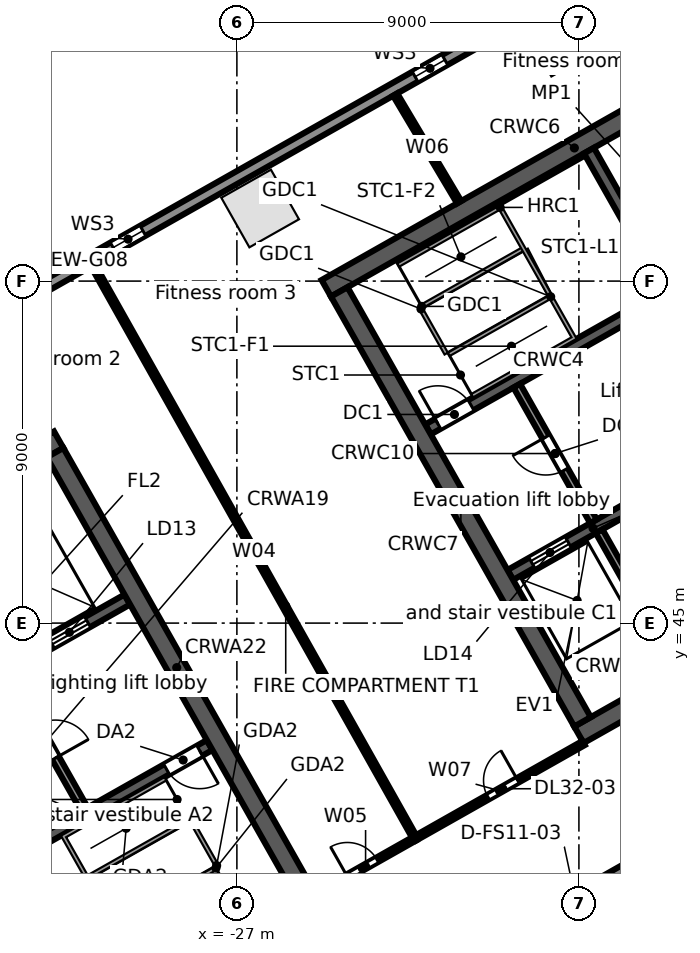
"""IFC4 building model, lengths in metres.
Left out: names, types, materials, properties, quantities, classifications, styles, units other than length and angle.
Written with IfcOpenShell. Run it as: python <this file> out.ifc"""

import sys

from ifc_helpers import new_model, si_unit, direction, frame, frame_2d, origin, origin_2d, place, context, subcontext, project, spatial, rectangle, extrude, element, fill, save


model = new_model("IFC4")
c1 = context("Model", 3, precision=1e-05, world=origin(), true_north=direction((0.0, 1.0)))
c2 = subcontext(c1, "Body", "Model", "MODEL_VIEW")
j1 = project(units=[si_unit("LENGTHUNIT", "METRE"), si_unit("PLANEANGLEUNIT", "RADIAN")], contexts=[c1])
p1 = place(None, origin())
s1 = spatial("IfcSite", under=j1, at=p1, CompositionType="ELEMENT")
p2 = place(p1, origin())
s2 = spatial("IfcBuilding", under=s1, at=p2, CompositionType="ELEMENT")
p3 = place(p2, frame((0.0, 0.0, 158.9)))
s3 = spatial("IfcBuildingStorey", under=s2, at=p3, CompositionType="ELEMENT", Elevation=158.9)
for number, where, z_axis, x_axis in (
    (1, (-18.441, 60.406, 0.0), (0.0, 0.0, 1.0), (-0.87, -0.492, 0.0)),
    (2, (-26.388, 55.91, 0.0), (0.0, 0.0, 1.0), (-0.87, -0.492, 0.0)),
):
    element("IfcColumn", number, at=place(p3, frame(where, z_axis=z_axis, x_axis=x_axis)), inside=s3, PredefinedType="COLUMN", context=c2, shape_type="SweptSolid", body=[
        extrude(rectangle(XDim=1.5, YDim=1.5, at=origin_2d()), origin(), (0.0, 0.0, 1.0), 4.0),
    ])
p4 = place(p3, frame((-0.055, 47.969, 0.0), z_axis=(0.0, 0.0, 1.0), x_axis=(-0.870355730478, -0.492423499058, 0.0)))
e3 = element("IfcWall", 3, at=p4, inside=s3, PredefinedType="STANDARD", context=c2, shape_type="SweptSolid", body=[
    extrude(rectangle(XDim=43.75, YDim=0.3, at=frame_2d((21.875, 0.0))), origin(), (0.0, 0.0, 1.0), 3.68),
])
p5 = place(p4, frame((39.977, 0.0, 0.6)))
e4 = element("IfcOpeningElement", 4, at=p5, cuts=e3, PredefinedType="OPENING", context=c2, shape_type="SweptSolid", body=[
    extrude(rectangle(XDim=0.9, YDim=2.4, at=frame_2d((0.45, 1.2))), frame((0.0, 0.16, 0.0), z_axis=(0.0, -1.0, 0.0), x_axis=(1.0, 0.0, 0.0)), (0.0, 0.0, 1.0), 0.32),
])
p6 = place(p4, frame((37.338, 0.0, 0.0)))
e5 = element("IfcOpeningElement", 5, at=p6, cuts=e3, PredefinedType="OPENING", context=c2, shape_type="SweptSolid", body=[
    extrude(rectangle(XDim=1.8, YDim=2.4, at=frame_2d((0.9, 1.2))), frame((0.0, 0.16, 0.0), z_axis=(0.0, -1.0, 0.0), x_axis=(1.0, 0.0, 0.0)), (0.0, 0.0, 1.0), 0.32),
])
p7 = place(p4, frame((31.222, 0.0, 0.6)))
e6 = element("IfcOpeningElement", 6, at=p7, cuts=e3, PredefinedType="OPENING", context=c2, shape_type="SweptSolid", body=[
    extrude(rectangle(XDim=0.9, YDim=2.4, at=frame_2d((0.45, 1.2))), frame((0.0, 0.16, 0.0), z_axis=(0.0, -1.0, 0.0), x_axis=(1.0, 0.0, 0.0)), (0.0, 0.0, 1.0), 0.32),
])
p8 = place(p4, frame((28.584, 0.0, 0.0)))
e7 = element("IfcOpeningElement", 7, at=p8, cuts=e3, PredefinedType="OPENING", context=c2, shape_type="SweptSolid", body=[
    extrude(rectangle(XDim=1.8, YDim=2.4, at=frame_2d((0.9, 1.2))), frame((0.0, 0.16, 0.0), z_axis=(0.0, -1.0, 0.0), x_axis=(1.0, 0.0, 0.0)), (0.0, 0.0, 1.0), 0.32),
])
p9 = place(p4, frame((22.468, 0.0, 0.6)))
e8 = element("IfcOpeningElement", 8, at=p9, cuts=e3, PredefinedType="OPENING", context=c2, shape_type="SweptSolid", body=[
    extrude(rectangle(XDim=0.9, YDim=2.4, at=frame_2d((0.45, 1.2))), frame((0.0, 0.16, 0.0), z_axis=(0.0, -1.0, 0.0), x_axis=(1.0, 0.0, 0.0)), (0.0, 0.0, 1.0), 0.32),
])
p10 = place(p4, frame((19.829, 0.0, 0.0)))
e9 = element("IfcOpeningElement", 9, at=p10, cuts=e3, PredefinedType="OPENING", context=c2, shape_type="SweptSolid", body=[
    extrude(rectangle(XDim=1.8, YDim=2.4, at=frame_2d((0.9, 1.2))), frame((0.0, 0.16, 0.0), z_axis=(0.0, -1.0, 0.0), x_axis=(1.0, 0.0, 0.0)), (0.0, 0.0, 1.0), 0.32),
])
p11 = place(p4, frame((13.713, 0.0, 0.6)))
e10 = element("IfcOpeningElement", 10, at=p11, cuts=e3, PredefinedType="OPENING", context=c2, shape_type="SweptSolid", body=[
    extrude(rectangle(XDim=0.9, YDim=2.4, at=frame_2d((0.45, 1.2))), frame((0.0, 0.16, 0.0), z_axis=(0.0, -1.0, 0.0), x_axis=(1.0, 0.0, 0.0)), (0.0, 0.0, 1.0), 0.32),
])
p12 = place(p4, frame((11.075, 0.0, 0.0)))
e11 = element("IfcOpeningElement", 11, at=p12, cuts=e3, PredefinedType="OPENING", context=c2, shape_type="SweptSolid", body=[
    extrude(rectangle(XDim=1.8, YDim=2.4, at=frame_2d((0.9, 1.2))), frame((0.0, 0.16, 0.0), z_axis=(0.0, -1.0, 0.0), x_axis=(1.0, 0.0, 0.0)), (0.0, 0.0, 1.0), 0.32),
])
p13 = place(p4, frame((4.959, 0.0, 0.6)))
e12 = element("IfcOpeningElement", 12, at=p13, cuts=e3, PredefinedType="OPENING", context=c2, shape_type="SweptSolid", body=[
    extrude(rectangle(XDim=0.9, YDim=2.4, at=frame_2d((0.45, 1.2))), frame((0.0, 0.16, 0.0), z_axis=(0.0, -1.0, 0.0), x_axis=(1.0, 0.0, 0.0)), (0.0, 0.0, 1.0), 0.32),
])
p14 = place(p4, frame((2.32, 0.0, 0.0)))
e13 = element("IfcOpeningElement", 13, at=p14, cuts=e3, PredefinedType="OPENING", context=c2, shape_type="SweptSolid", body=[
    extrude(rectangle(XDim=1.8, YDim=2.4, at=frame_2d((0.9, 1.2))), frame((0.0, 0.16, 0.0), z_axis=(0.0, -1.0, 0.0), x_axis=(1.0, 0.0, 0.0)), (0.0, 0.0, 1.0), 0.32),
])
p15 = place(p3, frame((-58.745, 38.764, 0.0), z_axis=(0.0, 0.0, 1.0), x_axis=(0.870355811726, 0.492423355453, 0.0)))
e14 = element("IfcWall", 14, at=p15, inside=s3, PredefinedType="STANDARD", context=c2, shape_type="SweptSolid", body=[
    extrude(rectangle(XDim=64.025, YDim=0.3, at=frame_2d((32.013, 0.0))), origin(), (0.0, 0.0, 1.0), 3.68),
])
p16 = place(p15, frame((60.122, 0.0, 0.6)))
e15 = element("IfcOpeningElement", 15, at=p16, cuts=e14, PredefinedType="OPENING", context=c2, shape_type="SweptSolid", body=[
    extrude(rectangle(XDim=0.9, YDim=2.4, at=frame_2d((0.45, 1.2))), frame((0.0, 0.16, 0.0), z_axis=(0.0, -1.0, 0.0), x_axis=(1.0, 0.0, 0.0)), (0.0, 0.0, 1.0), 0.32),
])
p17 = place(p15, frame((50.992, 0.0, 0.6)))
e16 = element("IfcOpeningElement", 16, at=p17, cuts=e14, PredefinedType="OPENING", context=c2, shape_type="SweptSolid", body=[
    extrude(rectangle(XDim=0.9, YDim=2.4, at=frame_2d((0.45, 1.2))), frame((0.0, 0.16, 0.0), z_axis=(0.0, -1.0, 0.0), x_axis=(1.0, 0.0, 0.0)), (0.0, 0.0, 1.0), 0.32),
])
p18 = place(p15, frame((41.862, 0.0, 0.6)))
e17 = element("IfcOpeningElement", 17, at=p18, cuts=e14, PredefinedType="OPENING", context=c2, shape_type="SweptSolid", body=[
    extrude(rectangle(XDim=0.9, YDim=2.4, at=frame_2d((0.45, 1.2))), frame((0.0, 0.16, 0.0), z_axis=(0.0, -1.0, 0.0), x_axis=(1.0, 0.0, 0.0)), (0.0, 0.0, 1.0), 0.32),
])
p19 = place(p15, frame((32.732, 0.0, 0.6)))
e18 = element("IfcOpeningElement", 18, at=p19, cuts=e14, PredefinedType="OPENING", context=c2, shape_type="SweptSolid", body=[
    extrude(rectangle(XDim=0.9, YDim=2.4, at=frame_2d((0.45, 1.2))), frame((0.0, 0.16, 0.0), z_axis=(0.0, -1.0, 0.0), x_axis=(1.0, 0.0, 0.0)), (0.0, 0.0, 1.0), 0.32),
])
p20 = place(p15, frame((23.602, 0.0, 0.6)))
e19 = element("IfcOpeningElement", 19, at=p20, cuts=e14, PredefinedType="OPENING", context=c2, shape_type="SweptSolid", body=[
    extrude(rectangle(XDim=0.9, YDim=2.4, at=frame_2d((0.45, 1.2))), frame((0.0, 0.16, 0.0), z_axis=(0.0, -1.0, 0.0), x_axis=(1.0, 0.0, 0.0)), (0.0, 0.0, 1.0), 0.32),
])
p21 = place(p15, frame((14.472, 0.0, 0.6)))
e20 = element("IfcOpeningElement", 20, at=p21, cuts=e14, PredefinedType="OPENING", context=c2, shape_type="SweptSolid", body=[
    extrude(rectangle(XDim=0.9, YDim=2.4, at=frame_2d((0.45, 1.2))), frame((0.0, 0.16, 0.0), z_axis=(0.0, -1.0, 0.0), x_axis=(1.0, 0.0, 0.0)), (0.0, 0.0, 1.0), 0.32),
])
p22 = place(p15, frame((5.342, 0.0, 0.6)))
e21 = element("IfcOpeningElement", 21, at=p22, cuts=e14, PredefinedType="OPENING", context=c2, shape_type="SweptSolid", body=[
    extrude(rectangle(XDim=0.9, YDim=2.4, at=frame_2d((0.45, 1.2))), frame((0.0, 0.16, 0.0), z_axis=(0.0, -1.0, 0.0), x_axis=(1.0, 0.0, 0.0)), (0.0, 0.0, 1.0), 0.32),
])
p23 = place(p3, frame((-34.245, 38.097, 0.0), z_axis=(0.0, 0.0, 1.0), x_axis=(0.870364520461, 0.492407962489, 0.0)))
e22 = element("IfcWall", 22, at=p23, inside=s3, PredefinedType="SOLIDWALL", context=c2, shape_type="SweptSolid", body=[
    extrude(rectangle(XDim=7.5, YDim=0.3, at=frame_2d((3.75, 0.0))), origin(), (0.0, 0.0, 1.0), 3.68),
])
p24 = place(p23, frame((6.2, 0.0, 0.0)))
e23 = element("IfcOpeningElement", 23, at=p24, cuts=e22, PredefinedType="OPENING", context=c2, shape_type="SweptSolid", body=[
    extrude(rectangle(XDim=1.0, YDim=2.1, at=frame_2d((0.5, 1.05))), frame((0.0, 0.16, 0.0), z_axis=(0.0, -1.0, 0.0), x_axis=(1.0, 0.0, 0.0)), (0.0, 0.0, 1.0), 0.32),
])
p25 = place(p3, frame((-37.282, 41.435, 0.0), z_axis=(0.0, 0.0, 1.0), x_axis=(0.870356271124, 0.492422543467, 0.0)))
e24 = element("IfcWall", 24, at=p25, inside=s3, PredefinedType="SOLIDWALL", context=c2, shape_type="SweptSolid", body=[
    extrude(rectangle(XDim=8.5, YDim=0.3, at=frame_2d((4.25, 0.0))), origin(), (0.0, 0.0, 1.0), 3.68),
])
p26 = place(p25, frame((6.2, 0.0, 0.0)))
e25 = element("IfcOpeningElement", 25, at=p26, cuts=e24, PredefinedType="OPENING", context=c2, shape_type="SweptSolid", body=[
    extrude(rectangle(XDim=1.1, YDim=2.1, at=frame_2d((0.55, 1.05))), frame((0.0, 0.16, 0.0), z_axis=(0.0, -1.0, 0.0), x_axis=(1.0, 0.0, 0.0)), (0.0, 0.0, 1.0), 0.32),
])
p27 = place(p25, frame((1.95, 0.0, 0.0)))
e26 = element("IfcOpeningElement", 26, at=p27, cuts=e24, PredefinedType="OPENING", context=c2, shape_type="SweptSolid", body=[
    extrude(rectangle(XDim=0.9, YDim=2.1, at=frame_2d((0.45, 1.05))), frame((0.0, 0.16, 0.0), z_axis=(0.0, -1.0, 0.0), x_axis=(1.0, 0.0, 0.0)), (0.0, 0.0, 1.0), 0.32),
])
p28 = place(p3, frame((-46.486, 41.455, 0.0), z_axis=(0.0, 0.0, 1.0), x_axis=(0.870353598469, 0.492427267353, 0.0)))
e27 = element("IfcWall", 27, at=p28, inside=s3, PredefinedType="SOLIDWALL", context=c2, shape_type="SweptSolid", body=[
    extrude(rectangle(XDim=17.0, YDim=0.5, at=frame_2d((8.5, 0.0))), origin(), (0.0, 0.0, 1.0), 3.68),
])
p29 = place(p3, frame((-33.031, 43.667, 0.0), z_axis=(0.0, 0.0, 1.0), x_axis=(0.492408451753, -0.87036424366, 0.0)))
e28 = element("IfcWall", 28, at=p29, inside=s3, PredefinedType="PARTITIONING", context=c2, shape_type="SweptSolid", body=[
    extrude(rectangle(XDim=4.1, YDim=0.2, at=frame_2d((2.05, 0.0))), origin(), (0.0, 0.0, 1.0), 3.68),
])
p30 = place(p29, frame((1.55, 0.0, 0.0)))
e29 = element("IfcOpeningElement", 29, at=p30, cuts=e28, PredefinedType="OPENING", context=c2, shape_type="SweptSolid", body=[
    extrude(rectangle(XDim=1.0, YDim=2.1, at=frame_2d((0.5, 1.05))), frame((0.0, 0.11, 0.0), z_axis=(0.0, -1.0, 0.0), x_axis=(1.0, 0.0, 0.0)), (0.0, 0.0, 1.0), 0.22),
])
p31 = place(p3, frame((-31.784, 49.486, 0.0), z_axis=(0.0, 0.0, 1.0), x_axis=(0.492435316254, -0.870349044525, 0.0)))
e30 = element("IfcWall", 30, at=p31, inside=s3, PredefinedType="SOLIDWALL", context=c2, shape_type="SweptSolid", body=[
    extrude(rectangle(XDim=13.0, YDim=0.5, at=frame_2d((6.5, 0.0))), origin(), (0.0, 0.0, 1.0), 3.68),
])
p32 = place(p3, frame((-18.0, 42.061, 0.0), z_axis=(0.0, 0.0, 1.0), x_axis=(0.870356627484, 0.492421913601, 0.0)))
e31 = element("IfcWall", 31, at=p32, inside=s3, PredefinedType="SOLIDWALL", context=c2, shape_type="SweptSolid", body=[
    extrude(rectangle(XDim=15.0, YDim=0.5, at=frame_2d((7.5, 0.0))), origin(), (0.0, 0.0, 1.0), 3.68),
])
p33 = place(p32, frame((6.1, 0.0, 0.0)))
e32 = element("IfcOpeningElement", 32, at=p33, cuts=e31, PredefinedType="OPENING", context=c2, shape_type="SweptSolid", body=[
    extrude(rectangle(XDim=1.2, YDim=2.1, at=frame_2d((0.6, 1.05))), frame((0.0, 0.26, 0.0), z_axis=(0.0, -1.0, 0.0), x_axis=(1.0, 0.0, 0.0)), (0.0, 0.0, 1.0), 0.52),
])
p34 = place(p3, frame((-19.805, 46.267, 0.0), z_axis=(0.0, 0.0, 1.0), x_axis=(0.870353598469, 0.492427267353, 0.0)))
e33 = element("IfcWall", 33, at=p34, inside=s3, PredefinedType="SOLIDWALL", context=c2, shape_type="SweptSolid", body=[
    extrude(rectangle(XDim=5.0, YDim=0.3, at=frame_2d((2.5, 0.0))), origin(), (0.0, 0.0, 1.0), 3.68),
])
p35 = place(p34, frame((0.65, 0.0, 0.0)))
e34 = element("IfcOpeningElement", 34, at=p35, cuts=e33, PredefinedType="OPENING", context=c2, shape_type="SweptSolid", body=[
    extrude(rectangle(XDim=1.1, YDim=2.1, at=frame_2d((0.55, 1.05))), frame((0.0, 0.16, 0.0), z_axis=(0.0, -1.0, 0.0), x_axis=(1.0, 0.0, 0.0)), (0.0, 0.0, 1.0), 0.32),
])
p36 = place(p34, frame((3.75, 0.0, 0.0)))
e35 = element("IfcOpeningElement", 35, at=p36, cuts=e33, PredefinedType="OPENING", context=c2, shape_type="SweptSolid", body=[
    extrude(rectangle(XDim=0.9, YDim=2.1, at=frame_2d((0.45, 1.05))), frame((0.0, 0.16, 0.0), z_axis=(0.0, -1.0, 0.0), x_axis=(1.0, 0.0, 0.0)), (0.0, 0.0, 1.0), 0.32),
])
p37 = place(p3, frame((-21.972, 50.097, 0.0), z_axis=(0.0, 0.0, 1.0), x_axis=(0.870350976978, 0.492431900747, 0.0)))
e36 = element("IfcWall", 36, at=p37, inside=s3, PredefinedType="SOLIDWALL", context=c2, shape_type="SweptSolid", body=[
    extrude(rectangle(XDim=7.3, YDim=0.3, at=frame_2d((3.65, 0.0))), origin(), (0.0, 0.0, 1.0), 3.68),
])
p38 = place(p37, frame((0.3, 0.0, 0.0)))
e37 = element("IfcOpeningElement", 37, at=p38, cuts=e36, PredefinedType="OPENING", context=c2, shape_type="SweptSolid", body=[
    extrude(rectangle(XDim=1.0, YDim=2.1, at=frame_2d((0.5, 1.05))), frame((0.0, 0.16, 0.0), z_axis=(0.0, -1.0, 0.0), x_axis=(1.0, 0.0, 0.0)), (0.0, 0.0, 1.0), 0.32),
])
p39 = place(p3, frame((-24.647, 53.811, 0.0), z_axis=(0.0, 0.0, 1.0), x_axis=(0.87034965173, 0.492434243055, 0.0)))
e38 = element("IfcWall", 38, at=p39, inside=s3, PredefinedType="SOLIDWALL", context=c2, shape_type="SweptSolid", body=[
    extrude(rectangle(XDim=15.0, YDim=0.5, at=frame_2d((7.5, 0.0))), origin(), (0.0, 0.0, 1.0), 3.68),
])
p40 = place(p3, frame((-24.307, 53.716, 0.0), z_axis=(0.0, 0.0, 1.0), x_axis=(0.492427267353, -0.870353598469, 0.0)))
e39 = element("IfcWall", 39, at=p40, inside=s3, PredefinedType="SOLIDWALL", context=c2, shape_type="SweptSolid", body=[
    extrude(rectangle(XDim=13.0, YDim=0.5, at=frame_2d((6.5, 0.0))), origin(), (0.0, 0.0, 1.0), 3.68),
])
p41 = place(p3, frame((-17.469, 47.417, 0.0), z_axis=(0.0, 0.0, 1.0), x_axis=(0.492441017253, -0.870345818929, 0.0)))
e40 = element("IfcWall", 40, at=p41, inside=s3, PredefinedType="SOLIDWALL", context=c2, shape_type="SweptSolid", body=[
    extrude(rectangle(XDim=4.15, YDim=0.2, at=frame_2d((2.075, 0.0))), origin(), (0.0, 0.0, 1.0), 3.68),
])
p42 = place(p3, frame((-19.635, 51.246, 0.0), z_axis=(0.0, 0.0, 1.0), x_axis=(0.492408451753, -0.87036424366, 0.0)))
e41 = element("IfcWall", 41, at=p42, inside=s3, PredefinedType="PARTITIONING", context=c2, shape_type="SweptSolid", body=[
    extrude(rectangle(XDim=4.1, YDim=0.2, at=frame_2d((2.05, 0.0))), origin(), (0.0, 0.0, 1.0), 3.68),
])
p43 = place(p42, frame((1.55, 0.0, 0.0)))
e42 = element("IfcOpeningElement", 42, at=p43, cuts=e41, PredefinedType="OPENING", context=c2, shape_type="SweptSolid", body=[
    extrude(rectangle(XDim=1.0, YDim=2.1, at=frame_2d((0.5, 1.05))), frame((0.0, 0.11, 0.0), z_axis=(0.0, -1.0, 0.0), x_axis=(1.0, 0.0, 0.0)), (0.0, 0.0, 1.0), 0.22),
])
p44 = place(p3, frame((-17.736, 57.434, 0.0), z_axis=(0.0, 0.0, 1.0), x_axis=(0.492421666909, -0.870356767055, 0.0)))
e43 = element("IfcWall", 43, at=p44, inside=s3, PredefinedType="SOLIDWALL", context=c2, shape_type="SweptSolid", body=[
    extrude(rectangle(XDim=4.15, YDim=0.3, at=frame_2d((2.075, 0.0))), origin(), (0.0, 0.0, 1.0), 3.68),
])
p45 = place(p3, frame((-30.785, 54.411, 0.0), z_axis=(0.0, 0.0, 1.0), x_axis=(0.490135904292, -0.871646026391, 0.0)))
e44 = element("IfcWall", 44, at=p45, inside=s3, PredefinedType="PARTITIONING", context=c2, shape_type="SweptSolid", body=[
    extrude(rectangle(XDim=17.295, YDim=0.125, at=frame_2d((8.647, 0.0))), origin(), (0.0, 0.0, 1.0), 2.852),
])
p46 = place(p3, frame((-24.919, 37.859, 0.0), z_axis=(0.0, 0.0, 1.0), x_axis=(0.870368744559, 0.492400496034, 0.0)))
e45 = element("IfcWall", 45, at=p46, inside=s3, PredefinedType="PARTITIONING", context=c2, shape_type="SweptSolid", body=[
    extrude(rectangle(XDim=3.0, YDim=0.125, at=frame_2d((1.5, 0.0))), origin(), (0.0, 0.0, 1.0), 2.852),
])
p47 = place(p46, frame((0.95, 0.0, 0.0)))
e46 = element("IfcOpeningElement", 46, at=p47, cuts=e45, PredefinedType="OPENING", context=c2, shape_type="SweptSolid", body=[
    extrude(rectangle(XDim=0.9, YDim=2.1, at=frame_2d((0.45, 1.05))), frame((0.0, 0.073, 0.0), z_axis=(0.0, -1.0, 0.0), x_axis=(1.0, 0.0, 0.0)), (0.0, 0.0, 1.0), 0.145),
])
p48 = place(p3, frame((-22.835, 58.908, 0.0), z_axis=(0.0, 0.0, 1.0), x_axis=(0.511113859879, -0.859513014584, 0.0)))
e47 = element("IfcWall", 47, at=p48, inside=s3, PredefinedType="PARTITIONING", context=c2, shape_type="SweptSolid", body=[
    extrude(rectangle(XDim=3.295, YDim=0.125, at=frame_2d((1.647, 0.0))), origin(), (0.0, 0.0, 1.0), 2.96),
])
p49 = place(p3, frame((-22.308, 39.336, 0.0), z_axis=(0.0, 0.0, 1.0), x_axis=(0.870351090701, 0.492431699747, 0.0)))
e48 = element("IfcWall", 48, at=p49, inside=s3, PredefinedType="PARTITIONING", context=c2, shape_type="SweptSolid", body=[
    extrude(rectangle(XDim=5.091, YDim=0.125, at=frame_2d((2.546, 0.0))), origin(), (0.0, 0.0, 1.0), 3.68),
])
p50 = place(p49, frame((2.2, 0.0, 0.0)))
e49 = element("IfcOpeningElement", 49, at=p50, cuts=e48, PredefinedType="OPENING", context=c2, shape_type="SweptSolid", body=[
    extrude(rectangle(XDim=0.9, YDim=2.1, at=frame_2d((0.45, 1.05))), frame((0.0, 0.073, 0.0), z_axis=(0.0, -1.0, 0.0), x_axis=(1.0, 0.0, 0.0)), (0.0, 0.0, 1.0), 0.145),
])
p51 = place(p18, origin())
e50 = element("IfcWindow", 50, at=p51, inside=s3, PartitioningType="SINGLE_PANEL", PredefinedType="WINDOW", context=c2, shape_type="SweptSolid", body=[
    extrude(rectangle(XDim=0.9, YDim=2.4, at=frame_2d((0.45, 1.2))), frame((0.0, 0.03, 0.0), z_axis=(0.0, -1.0, 0.0), x_axis=(1.0, 0.0, 0.0)), (0.0, 0.0, 1.0), 0.06),
])
fill(e17, e50)
p52 = place(p19, origin())
e51 = element("IfcWindow", 51, at=p52, inside=s3, PartitioningType="SINGLE_PANEL", PredefinedType="WINDOW", context=c2, shape_type="SweptSolid", body=[
    extrude(rectangle(XDim=0.9, YDim=2.4, at=frame_2d((0.45, 1.2))), frame((0.0, 0.03, 0.0), z_axis=(0.0, -1.0, 0.0), x_axis=(1.0, 0.0, 0.0)), (0.0, 0.0, 1.0), 0.06),
])
fill(e18, e51)
p53 = place(p26, origin())
e52 = element("IfcDoor", 52, at=p53, inside=s3, OperationType="DOUBLE_DOOR_SLIDING", PredefinedType="DOOR", context=c2, shape_type="SweptSolid", body=[
    extrude(rectangle(XDim=1.1, YDim=2.1, at=frame_2d((0.55, 1.05))), frame((0.0, 0.025, 0.0), z_axis=(0.0, -1.0, 0.0), x_axis=(1.0, 0.0, 0.0)), (0.0, 0.0, 1.0), 0.05),
])
fill(e25, e52)
p54 = place(p24, frame((1.0, 0.0, 0.0), z_axis=(0.0, 0.0, 1.0), x_axis=(-1.0, 0.0, 0.0)))
e53 = element("IfcDoor", 53, at=p54, inside=s3, OperationType="SINGLE_SWING_LEFT", PredefinedType="DOOR", context=c2, shape_type="SweptSolid", body=[
    extrude(rectangle(XDim=1.0, YDim=2.1, at=frame_2d((0.5, 1.05))), frame((0.0, 0.025, 0.0), z_axis=(0.0, -1.0, 0.0), x_axis=(1.0, 0.0, 0.0)), (0.0, 0.0, 1.0), 0.05),
])
fill(e23, e53)
p55 = place(p30, origin())
e54 = element("IfcDoor", 54, at=p55, inside=s3, OperationType="SINGLE_SWING_RIGHT", PredefinedType="DOOR", context=c2, shape_type="SweptSolid", body=[
    extrude(rectangle(XDim=1.0, YDim=2.1, at=frame_2d((0.5, 1.05))), frame((0.0, 0.025, 0.0), z_axis=(0.0, -1.0, 0.0), x_axis=(1.0, 0.0, 0.0)), (0.0, 0.0, 1.0), 0.05),
])
fill(e29, e54)
p56 = place(p35, origin())
e55 = element("IfcDoor", 55, at=p56, inside=s3, OperationType="DOUBLE_DOOR_SLIDING", PredefinedType="DOOR", context=c2, shape_type="SweptSolid", body=[
    extrude(rectangle(XDim=1.1, YDim=2.1, at=frame_2d((0.55, 1.05))), frame((0.0, 0.025, 0.0), z_axis=(0.0, -1.0, 0.0), x_axis=(1.0, 0.0, 0.0)), (0.0, 0.0, 1.0), 0.05),
])
fill(e34, e55)
p57 = place(p38, origin())
e56 = element("IfcDoor", 56, at=p57, inside=s3, OperationType="SINGLE_SWING_LEFT", PredefinedType="DOOR", context=c2, shape_type="SweptSolid", body=[
    extrude(rectangle(XDim=1.0, YDim=2.1, at=frame_2d((0.5, 1.05))), frame((0.0, 0.025, 0.0), z_axis=(0.0, -1.0, 0.0), x_axis=(1.0, 0.0, 0.0)), (0.0, 0.0, 1.0), 0.05),
])
fill(e37, e56)
p58 = place(p43, frame((1.0, 0.0, 0.0), z_axis=(0.0, 0.0, 1.0), x_axis=(-1.0, 0.0, 0.0)))
e57 = element("IfcDoor", 57, at=p58, inside=s3, OperationType="SINGLE_SWING_RIGHT", PredefinedType="DOOR", context=c2, shape_type="SweptSolid", body=[
    extrude(rectangle(XDim=1.0, YDim=2.1, at=frame_2d((0.5, 1.05))), frame((0.0, 0.025, 0.0), z_axis=(0.0, -1.0, 0.0), x_axis=(1.0, 0.0, 0.0)), (0.0, 0.0, 1.0), 0.05),
])
fill(e42, e57)
p59 = place(p47, origin())
e58 = element("IfcDoor", 58, at=p59, inside=s3, OperationType="SINGLE_SWING_LEFT", PredefinedType="DOOR", context=c2, shape_type="SweptSolid", body=[
    extrude(rectangle(XDim=0.9, YDim=2.1, at=frame_2d((0.45, 1.05))), frame((0.0, 0.025, 0.0), z_axis=(0.0, -1.0, 0.0), x_axis=(1.0, 0.0, 0.0)), (0.0, 0.0, 1.0), 0.05),
])
fill(e46, e58)
p60 = place(p50, origin())
e59 = element("IfcDoor", 59, at=p60, inside=s3, OperationType="SINGLE_SWING_RIGHT", PredefinedType="DOOR", context=c2, shape_type="SweptSolid", body=[
    extrude(rectangle(XDim=0.9, YDim=2.1, at=frame_2d((0.45, 1.05))), frame((0.0, 0.025, 0.0), z_axis=(0.0, -1.0, 0.0), x_axis=(1.0, 0.0, 0.0)), (0.0, 0.0, 1.0), 0.05),
])
fill(e49, e59)
save(model, sys.argv[1])
